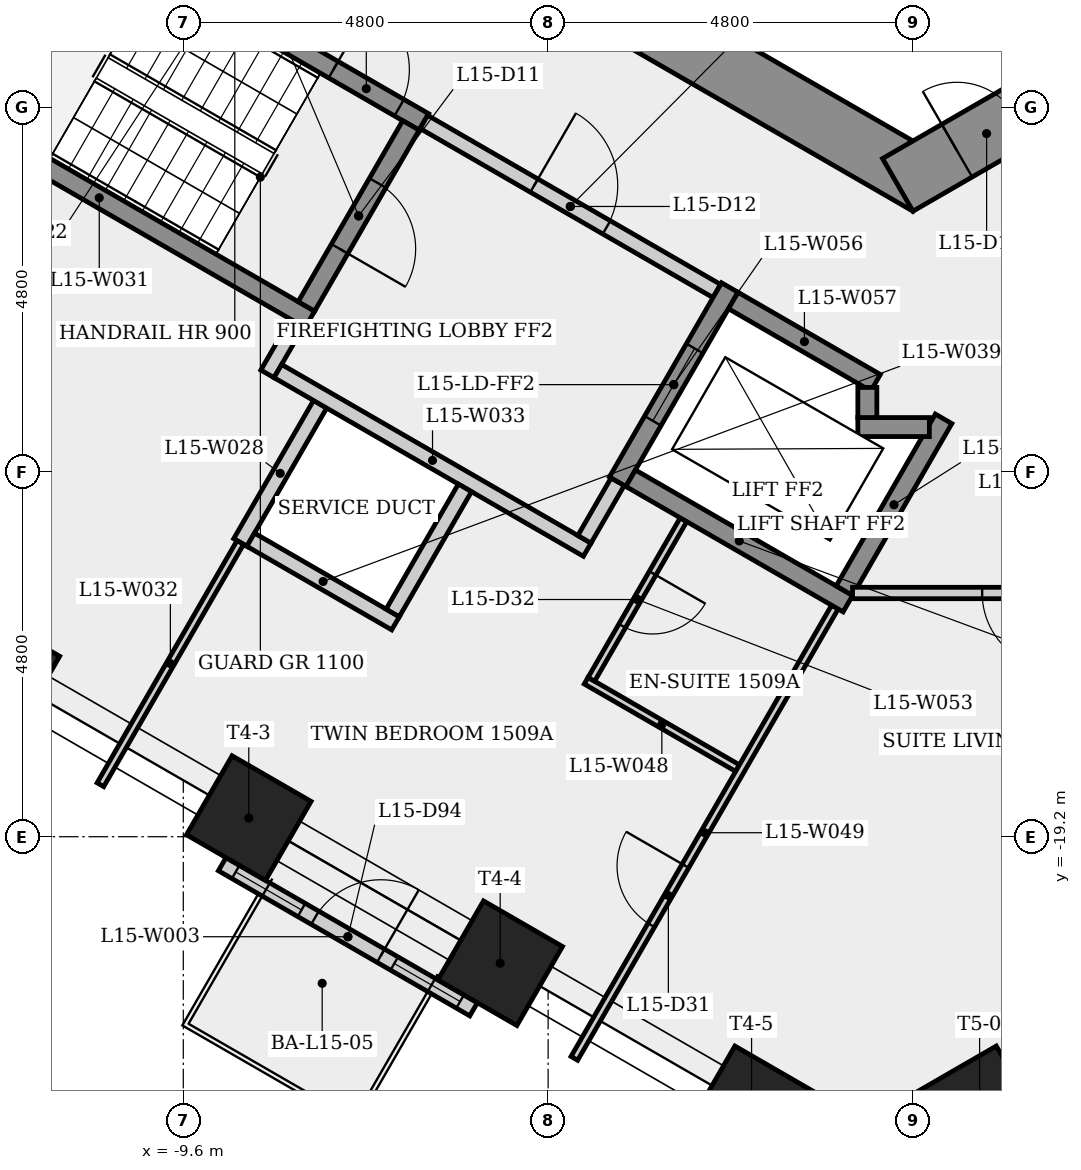
"""IFC4 building model, lengths in metres.
Left out: names, types, materials, properties, quantities, classifications, styles, units other than length and angle.
Written with IfcOpenShell. Run it as: python <this file> out.ifc"""

import sys

from ifc_helpers import new_model, si_unit, direction, frame, frame_2d, origin, origin_2d, place, context, subcontext, project, spatial, rectangle, extrude, element, fill, save


model = new_model("IFC4")
c1 = context("Model", 3, precision=1e-05, world=origin(), true_north=direction((0.0, 1.0)))
c2 = subcontext(c1, "Body", "Model", "MODEL_VIEW")
j1 = project(units=[si_unit("LENGTHUNIT", "METRE"), si_unit("PLANEANGLEUNIT", "RADIAN")], contexts=[c1])
p1 = place(None, origin())
s1 = spatial("IfcSite", under=j1, at=p1, CompositionType="ELEMENT")
p2 = place(p1, origin())
s2 = spatial("IfcBuilding", under=s1, at=p2, CompositionType="ELEMENT")
p3 = place(p2, frame((0.0, 0.0, 59.5)))
s3 = spatial("IfcBuildingStorey", under=s2, at=p3, CompositionType="ELEMENT", Elevation=59.5)
p4 = place(p3, frame((-9.3, -5.138, 0.0), z_axis=(0.0, 0.0, 1.0), x_axis=(0.866023993627, -0.500002442456, 0.0)))
e1 = element("IfcWall", 1, at=p4, inside=s3, PredefinedType="SHEAR", context=c2, shape_type="SweptSolid", body=[
    extrude(rectangle(XDim=10.97, YDim=0.8, at=frame_2d((5.485, 0.0))), origin(), (0.0, 0.0, 1.0), 3.4),
])
p5 = place(p4, frame((0.78, 0.0, 0.0)))
e2 = element("IfcOpeningElement", 2, at=p5, cuts=e1, PredefinedType="OPENING", context=c2, shape_type="SweptSolid", body=[
    extrude(rectangle(XDim=0.9, YDim=2.1, at=frame_2d((0.45, 1.05))), frame((0.0, 0.41, 0.0), z_axis=(0.0, -1.0, 0.0), x_axis=(1.0, 0.0, 0.0)), (0.0, 0.0, 1.0), 0.82),
])
p6 = place(p3, frame((-0.2, -10.623, 0.0), z_axis=(0.0, 0.0, 1.0), x_axis=(0.866023993627, 0.500002442456, 0.0)))
e3 = element("IfcWall", 3, at=p6, inside=s3, PredefinedType="SHEAR", context=c2, shape_type="SweptSolid", body=[
    extrude(rectangle(XDim=10.97, YDim=0.8, at=frame_2d((5.485, 0.0))), origin(), (0.0, 0.0, 1.0), 3.4),
])
p7 = place(p6, frame((0.9, 0.0, 0.0)))
e4 = element("IfcOpeningElement", 4, at=p7, cuts=e3, PredefinedType="OPENING", context=c2, shape_type="SweptSolid", body=[
    extrude(rectangle(XDim=0.9, YDim=2.1, at=frame_2d((0.45, 1.05))), frame((0.0, 0.41, 0.0), z_axis=(0.0, -1.0, 0.0), x_axis=(1.0, 0.0, 0.0)), (0.0, 0.0, 1.0), 0.82),
])
p8 = place(p6, frame((7.455, 0.0, 0.0)))
e5 = element("IfcOpeningElement", 5, at=p8, cuts=e3, PredefinedType="OPENING", context=c2, shape_type="SweptSolid", body=[
    extrude(rectangle(XDim=0.9, YDim=2.1, at=frame_2d((0.45, 1.05))), frame((0.0, 0.41, 0.0), z_axis=(0.0, -1.0, 0.0), x_axis=(1.0, 0.0, 0.0)), (0.0, 0.0, 1.0), 0.82),
])
for number, where, z_axis, x_axis in (
    (6, (-12.046, -17.045, 0.0), (0.0, 0.0, 1.0), (-0.5, -0.866, 0.0)),
    (7, (-8.739, -18.955, 0.0), (0.0, 0.0, 1.0), (-0.5, -0.866, 0.0)),
    (8, (-5.431, -20.865, 0.0), (0.0, 0.0, 1.0), (-0.5, -0.866, 0.0)),
    (9, (-2.123, -22.774, 0.0), (0.0, 0.0, 1.0), (-0.5, -0.866, 0.0)),
    (10, (0.877, -22.774, 0.0), (0.0, 0.0, 1.0), (0.5, -0.866, 0.0)),
):
    element("IfcColumn", number, at=place(p3, frame(where, z_axis=z_axis, x_axis=x_axis)), inside=s3, PredefinedType="COLUMN", context=c2, shape_type="SweptSolid", body=[
        extrude(rectangle(XDim=1.2, YDim=1.2, at=origin_2d()), origin(), (0.0, 0.0, 1.0), 3.4),
    ])
p9 = place(p3, frame((-9.088, -19.561, 0.0), z_axis=(0.0, 0.0, 1.0), x_axis=(0.866035482435, -0.49998254286, 0.0)))
e11 = element("IfcWall", 11, at=p9, inside=s3, PredefinedType="SOLIDWALL", context=c2, shape_type="SweptSolid", body=[
    extrude(rectangle(XDim=3.819, YDim=0.2, at=frame_2d((1.91, 0.0))), origin(), (0.0, 0.0, 1.0), 3.4),
])
p10 = place(p9, frame((1.409, 0.0, 0.0)))
e12 = element("IfcOpeningElement", 12, at=p10, cuts=e11, PredefinedType="OPENING", context=c2, shape_type="SweptSolid", body=[
    extrude(rectangle(XDim=1.0, YDim=2.4, at=frame_2d((0.5, 1.2))), frame((0.0, 0.11, 0.0), z_axis=(0.0, -1.0, 0.0), x_axis=(1.0, 0.0, 0.0)), (0.0, 0.0, 1.0), 0.22),
])
p11 = place(p9, frame((0.205, 0.0, 0.9)))
e13 = element("IfcOpeningElement", 13, at=p11, cuts=e11, PredefinedType="OPENING", context=c2, shape_type="SweptSolid", body=[
    extrude(rectangle(XDim=1.0, YDim=1.5, at=frame_2d((0.5, 0.75))), frame((0.0, 0.11, 0.0), z_axis=(0.0, -1.0, 0.0), x_axis=(1.0, 0.0, 0.0)), (0.0, 0.0, 1.0), 0.22),
])
p12 = place(p9, frame((2.614, 0.0, 0.9)))
e14 = element("IfcOpeningElement", 14, at=p12, cuts=e11, PredefinedType="OPENING", context=c2, shape_type="SweptSolid", body=[
    extrude(rectangle(XDim=1.0, YDim=1.5, at=frame_2d((0.5, 0.75))), frame((0.0, 0.11, 0.0), z_axis=(0.0, -1.0, 0.0), x_axis=(1.0, 0.0, 0.0)), (0.0, 0.0, 1.0), 0.22),
])
p13 = place(p3, frame((-11.977, -6.595, 0.0), z_axis=(0.0, 0.0, 1.0), x_axis=(0.866025499775, -0.499999833739, 0.0)))
e15 = element("IfcWall", 15, at=p13, inside=s3, PredefinedType="SHEAR", context=c2, shape_type="SweptSolid", body=[
    extrude(rectangle(XDim=6.4, YDim=0.25, at=frame_2d((3.2, 0.0))), origin(), (0.0, 0.0, 1.0), 3.05),
])
p14 = place(p13, frame((5.025, 0.0, 0.0)))
e16 = element("IfcOpeningElement", 16, at=p14, cuts=e15, PredefinedType="OPENING", context=c2, shape_type="SweptSolid", body=[
    extrude(rectangle(XDim=1.0, YDim=2.1, at=frame_2d((0.5, 1.05))), frame((0.0, 0.135, 0.0), z_axis=(0.0, -1.0, 0.0), x_axis=(1.0, 0.0, 0.0)), (0.0, 0.0, 1.0), 0.27),
])
p15 = place(p3, frame((-8.85, -15.329, 0.0), z_axis=(0.0, 0.0, 1.0), x_axis=(0.500027713859, 0.866009402589, 0.0)))
e17 = element("IfcWall", 17, at=p15, inside=s3, PredefinedType="PLUMBINGWALL", context=c2, shape_type="SweptSolid", body=[
    extrude(rectangle(XDim=2.1, YDim=0.2, at=frame_2d((1.05, 0.0))), origin(), (0.0, 0.0, 1.0), 3.05),
])
p16 = place(p3, frame((-8.493, -13.11, 0.0), z_axis=(0.0, 0.0, 1.0), x_axis=(0.500067724834, 0.865986299303, 0.0)))
e18 = element("IfcWall", 18, at=p16, inside=s3, PredefinedType="PARTITIONING", context=c2, shape_type="SweptSolid", body=[
    extrude(rectangle(XDim=0.775, YDim=0.2, at=frame_2d((0.388, 0.0))), origin(), (0.0, 0.0, 1.0), 3.05),
])
p17 = place(p3, frame((-7.935, -12.393, 0.0), z_axis=(0.0, 0.0, 1.0), x_axis=(-0.866025499775, 0.499999833739, 0.0)))
e19 = element("IfcWall", 19, at=p17, inside=s3, PredefinedType="SHEAR", context=c2, shape_type="SweptSolid", body=[
    extrude(rectangle(XDim=6.4, YDim=0.25, at=frame_2d((3.2, 0.0))), origin(), (0.0, 0.0, 1.0), 3.05),
])
p18 = place(p3, frame((-10.69, -18.516, 0.0), z_axis=(0.0, 0.0, 1.0), x_axis=(0.499955964762, 0.866050826049, 0.0)))
e20 = element("IfcWall", 20, at=p18, inside=s3, PredefinedType="PARTITIONING", context=c2, shape_type="SweptSolid", body=[
    extrude(rectangle(XDim=3.68, YDim=0.1, at=frame_2d((1.84, 0.0))), origin(), (0.0, 0.0, 1.0), 3.05),
])
p19 = place(p3, frame((-8.356, -13.073, 0.0), z_axis=(0.0, 0.0, 1.0), x_axis=(0.866038532462, -0.499977259774, 0.0)))
e21 = element("IfcWall", 21, at=p19, inside=s3, PredefinedType="PARTITIONING", context=c2, shape_type="SweptSolid", body=[
    extrude(rectangle(XDim=4.7, YDim=0.2, at=frame_2d((2.35, 0.0))), origin(), (0.0, 0.0, 1.0), 3.05),
])
p20 = place(p3, frame((-6.808, -16.392, 0.0), z_axis=(0.0, 0.0, 1.0), x_axis=(-0.866008176907, 0.50002983664, 0.0)))
e22 = element("IfcWall", 22, at=p20, inside=s3, PredefinedType="PLUMBINGWALL", context=c2, shape_type="SweptSolid", body=[
    extrude(rectangle(XDim=2.2, YDim=0.2, at=frame_2d((1.1, 0.0))), origin(), (0.0, 0.0, 1.0), 3.05),
])
p21 = place(p3, frame((-6.605, -9.841, 0.0), z_axis=(0.0, 0.0, 1.0), x_axis=(-0.499996545922, -0.866027397988, 0.0)))
e23 = element("IfcWall", 23, at=p21, inside=s3, PredefinedType="SHEAR", context=c2, shape_type="SweptSolid", body=[
    extrude(rectangle(XDim=2.75, YDim=0.25, at=frame_2d((1.375, 0.0))), origin(), (0.0, 0.0, 1.0), 3.05),
])
p22 = place(p21, frame((0.875, 0.0, 0.0)))
e24 = element("IfcOpeningElement", 24, at=p22, cuts=e23, PredefinedType="OPENING", context=c2, shape_type="SweptSolid", body=[
    extrude(rectangle(XDim=1.0, YDim=2.1, at=frame_2d((0.5, 1.05))), frame((0.0, 0.135, 0.0), z_axis=(0.0, -1.0, 0.0), x_axis=(1.0, 0.0, 0.0)), (0.0, 0.0, 1.0), 0.27),
])
p23 = place(p3, frame((-6.435, -9.795, 0.0), z_axis=(0.0, 0.0, 1.0), x_axis=(0.866012907634, -0.500021643343, 0.0)))
e25 = element("IfcWall", 25, at=p23, inside=s3, PredefinedType="PARTITIONING", context=c2, shape_type="SweptSolid", body=[
    extrude(rectangle(XDim=4.45, YDim=0.2, at=frame_2d((2.225, 0.0))), origin(), (0.0, 0.0, 1.0), 3.05),
])
p24 = place(p23, frame((1.675, 0.0, 0.0)))
e26 = element("IfcOpeningElement", 26, at=p24, cuts=e25, PredefinedType="OPENING", context=c2, shape_type="SweptSolid", body=[
    extrude(rectangle(XDim=1.1, YDim=2.1, at=frame_2d((0.55, 1.05))), frame((0.0, 0.11, 0.0), z_axis=(0.0, -1.0, 0.0), x_axis=(1.0, 0.0, 0.0)), (0.0, 0.0, 1.0), 0.22),
])
p25 = place(p3, frame((-5.895, -14.61, 0.0), z_axis=(0.0, 0.0, 1.0), x_axis=(-0.500022797313, -0.86601224135, 0.0)))
e27 = element("IfcWall", 27, at=p25, inside=s3, PredefinedType="PLUMBINGWALL", context=c2, shape_type="SweptSolid", body=[
    extrude(rectangle(XDim=1.9, YDim=0.2, at=frame_2d((0.95, 0.0))), origin(), (0.0, 0.0, 1.0), 3.05),
])
p26 = place(p3, frame((-4.3, -17.147, 0.0), z_axis=(0.0, 0.0, 1.0), x_axis=(0.866053019151, -0.499952165731, 0.0)))
e28 = element("IfcWall", 28, at=p26, inside=s3, PredefinedType="PARTITIONING", context=c2, shape_type="SweptSolid", body=[
    extrude(rectangle(XDim=2.3, YDim=0.1, at=frame_2d((1.15, 0.0))), origin(), (0.0, 0.0, 1.0), 3.05),
])
p27 = place(p3, frame((-4.455, -22.116, 0.0), z_axis=(0.0, 0.0, 1.0), x_axis=(0.499984476993, 0.866034365811, 0.0)))
e29 = element("IfcWall", 29, at=p27, inside=s3, PredefinedType="PARTITIONING", context=c2, shape_type="SweptSolid", body=[
    extrude(rectangle(XDim=6.856, YDim=0.1, at=frame_2d((3.428, 0.0))), origin(), (0.0, 0.0, 1.0), 3.05),
])
p28 = place(p27, frame((2.023, 0.0, 0.0)))
e30 = element("IfcOpeningElement", 30, at=p28, cuts=e29, PredefinedType="OPENING", context=c2, shape_type="SweptSolid", body=[
    extrude(rectangle(XDim=0.9, YDim=2.1, at=frame_2d((0.45, 1.05))), frame((0.0, 0.06, 0.0), z_axis=(0.0, -1.0, 0.0), x_axis=(1.0, 0.0, 0.0)), (0.0, 0.0, 1.0), 0.12),
])
p29 = place(p3, frame((-3.885, -14.529, 0.0), z_axis=(0.0, 0.0, 1.0), x_axis=(-0.499859285417, -0.866106630146, 0.0)))
e31 = element("IfcWall", 31, at=p29, inside=s3, PredefinedType="PARTITIONING", context=c2, shape_type="SweptSolid", body=[
    extrude(rectangle(XDim=0.875, YDim=0.2, at=frame_2d((0.438, 0.0))), origin(), (0.0, 0.0, 1.0), 3.05),
])
p30 = place(p3, frame((-3.019, -15.029, 0.0), z_axis=(0.0, 0.0, 1.0), x_axis=(-0.499972286653, -0.866041403502, 0.0)))
e32 = element("IfcWall", 32, at=p30, inside=s3, PredefinedType="PARTITIONING", context=c2, shape_type="SweptSolid", body=[
    extrude(rectangle(XDim=2.425, YDim=0.1, at=frame_2d((1.212, 0.0))), origin(), (0.0, 0.0, 1.0), 3.05),
])
p31 = place(p30, frame((0.812, 0.0, 0.0)))
e33 = element("IfcOpeningElement", 33, at=p31, cuts=e32, PredefinedType="OPENING", context=c2, shape_type="SweptSolid", body=[
    extrude(rectangle(XDim=0.8, YDim=2.1, at=frame_2d((0.4, 1.05))), frame((0.0, 0.06, 0.0), z_axis=(0.0, -1.0, 0.0), x_axis=(1.0, 0.0, 0.0)), (0.0, 0.0, 1.0), 0.12),
])
p32 = place(p3, frame((-2.41, -11.974, 0.0), z_axis=(0.0, 0.0, 1.0), x_axis=(-0.500001826776, -0.866024349092, 0.0)))
e34 = element("IfcWall", 34, at=p32, inside=s3, PredefinedType="SHEAR", context=c2, shape_type="SweptSolid", body=[
    extrude(rectangle(XDim=2.95, YDim=0.25, at=frame_2d((1.475, 0.0))), origin(), (0.0, 0.0, 1.0), 3.05),
])
p33 = place(p32, frame((0.925, 0.0, 0.0)))
e35 = element("IfcOpeningElement", 35, at=p33, cuts=e34, PredefinedType="OPENING", context=c2, shape_type="SweptSolid", body=[
    extrude(rectangle(XDim=1.1, YDim=2.1, at=frame_2d((0.55, 1.05))), frame((0.0, 0.135, 0.0), z_axis=(0.0, -1.0, 0.0), x_axis=(1.0, 0.0, 0.0)), (0.0, 0.0, 1.0), 0.27),
])
p34 = place(p3, frame((-2.364, -12.145, 0.0), z_axis=(0.0, 0.0, 1.0), x_axis=(0.86603892542, -0.499976579108, 0.0)))
e36 = element("IfcWall", 36, at=p34, inside=s3, PredefinedType="SHEAR", context=c2, shape_type="SweptSolid", body=[
    extrude(rectangle(XDim=2.162, YDim=0.25, at=frame_2d((1.081, 0.0))), origin(), (0.0, 0.0, 1.0), 3.05),
])
p35 = place(p3, frame((-0.856, -16.133, 0.0), z_axis=(0.0, 0.0, 1.0), x_axis=(-0.866021716278, 0.500006386895, 0.0)))
e37 = element("IfcWall", 37, at=p35, inside=s3, PredefinedType="SHEAR", context=c2, shape_type="SweptSolid", body=[
    extrude(rectangle(XDim=3.3, YDim=0.25, at=frame_2d((1.65, 0.0))), origin(), (0.0, 0.0, 1.0), 3.05),
])
p36 = place(p3, frame((-0.902, -15.962, 0.0), z_axis=(0.0, 0.0, 1.0), x_axis=(0.499981517636, 0.866036074319, 0.0)))
e38 = element("IfcWall", 38, at=p36, inside=s3, PredefinedType="SHEAR", context=c2, shape_type="SweptSolid", body=[
    extrude(rectangle(XDim=2.61, YDim=0.25, at=frame_2d((1.305, 0.0))), origin(), (0.0, 0.0, 1.0), 3.05),
])
p37 = place(p3, frame((-0.725, -13.81, 0.0), z_axis=(0.0, 0.0, 1.0), x_axis=(1.0, 0.0, 0.0)))
e39 = element("IfcWall", 39, at=p37, inside=s3, PredefinedType="SHEAR", context=c2, shape_type="SweptSolid", body=[
    extrude(rectangle(XDim=0.941, YDim=0.25, at=frame_2d((0.47, 0.0))), origin(), (0.0, 0.0, 1.0), 3.4),
])
p38 = place(p3, frame((-0.6, -13.289, 0.0), z_axis=(0.0, 0.0, 1.0), x_axis=(0.0, -1.0, 0.0)))
e40 = element("IfcWall", 40, at=p38, inside=s3, PredefinedType="SHEAR", context=c2, shape_type="SweptSolid", body=[
    extrude(rectangle(XDim=0.396, YDim=0.25, at=frame_2d((0.198, 0.0))), origin(), (0.0, 0.0, 1.0), 3.4),
])
p39 = place(p3, frame((3.616, -15.993, 0.0), z_axis=(0.0, 0.0, 1.0), x_axis=(-1.0, 0.0, 0.0)))
e41 = element("IfcWall", 41, at=p39, inside=s3, PredefinedType="PARTITIONING", context=c2, shape_type="SweptSolid", body=[
    extrude(rectangle(XDim=4.411, YDim=0.15, at=frame_2d((2.206, 0.0))), origin(), (0.0, 0.0, 1.0), 3.05),
])
p40 = place(p39, frame((1.706, 0.0, 0.0)))
e42 = element("IfcOpeningElement", 42, at=p40, cuts=e41, PredefinedType="OPENING", context=c2, shape_type="SweptSolid", body=[
    extrude(rectangle(XDim=1.0, YDim=2.1, at=frame_2d((0.5, 1.05))), frame((0.0, 0.085, 0.0), z_axis=(0.0, -1.0, 0.0), x_axis=(1.0, 0.0, 0.0)), (0.0, 0.0, 1.0), 0.17),
])
p41 = place(p10, origin())
e43 = element("IfcDoor", 43, at=p41, inside=s3, OperationType="SINGLE_SWING_RIGHT", PredefinedType="DOOR", context=c2, shape_type="SweptSolid", body=[
    extrude(rectangle(XDim=1.0, YDim=2.4, at=frame_2d((0.5, 1.2))), frame((0.0, 0.025, 0.0), z_axis=(0.0, -1.0, 0.0), x_axis=(1.0, 0.0, 0.0)), (0.0, 0.0, 1.0), 0.05),
])
fill(e12, e43)
p42 = place(p11, origin())
e44 = element("IfcWindow", 44, at=p42, inside=s3, PartitioningType="SINGLE_PANEL", PredefinedType="WINDOW", context=c2, shape_type="SweptSolid", body=[
    extrude(rectangle(XDim=1.0, YDim=1.5, at=frame_2d((0.5, 0.75))), frame((0.0, 0.03, 0.0), z_axis=(0.0, -1.0, 0.0), x_axis=(1.0, 0.0, 0.0)), (0.0, 0.0, 1.0), 0.06),
])
fill(e13, e44)
p43 = place(p12, origin())
e45 = element("IfcWindow", 45, at=p43, inside=s3, PartitioningType="SINGLE_PANEL", PredefinedType="WINDOW", context=c2, shape_type="SweptSolid", body=[
    extrude(rectangle(XDim=1.0, YDim=1.5, at=frame_2d((0.5, 0.75))), frame((0.0, 0.03, 0.0), z_axis=(0.0, -1.0, 0.0), x_axis=(1.0, 0.0, 0.0)), (0.0, 0.0, 1.0), 0.06),
])
fill(e14, e45)
p44 = place(p14, origin())
e46 = element("IfcDoor", 46, at=p44, inside=s3, OperationType="SINGLE_SWING_LEFT", PredefinedType="DOOR", context=c2, shape_type="SweptSolid", body=[
    extrude(rectangle(XDim=1.0, YDim=2.1, at=frame_2d((0.5, 1.05))), frame((0.0, 0.025, 0.0), z_axis=(0.0, -1.0, 0.0), x_axis=(1.0, 0.0, 0.0)), (0.0, 0.0, 1.0), 0.05),
])
fill(e16, e46)
p45 = place(p22, origin())
e47 = element("IfcDoor", 47, at=p45, inside=s3, OperationType="SINGLE_SWING_RIGHT", PredefinedType="DOOR", context=c2, shape_type="SweptSolid", body=[
    extrude(rectangle(XDim=1.0, YDim=2.1, at=frame_2d((0.5, 1.05))), frame((0.0, 0.025, 0.0), z_axis=(0.0, -1.0, 0.0), x_axis=(1.0, 0.0, 0.0)), (0.0, 0.0, 1.0), 0.05),
])
fill(e24, e47)
p46 = place(p24, origin())
e48 = element("IfcDoor", 48, at=p46, inside=s3, OperationType="SINGLE_SWING_LEFT", PredefinedType="DOOR", context=c2, shape_type="SweptSolid", body=[
    extrude(rectangle(XDim=1.1, YDim=2.1, at=frame_2d((0.55, 1.05))), frame((0.0, 0.025, 0.0), z_axis=(0.0, -1.0, 0.0), x_axis=(1.0, 0.0, 0.0)), (0.0, 0.0, 1.0), 0.05),
])
fill(e26, e48)
p47 = place(p33, origin())
e49 = element("IfcDoor", 49, at=p47, inside=s3, OperationType="SLIDING_TO_LEFT", PredefinedType="DOOR", context=c2, shape_type="SweptSolid", body=[
    extrude(rectangle(XDim=1.1, YDim=2.1, at=frame_2d((0.55, 1.05))), frame((0.0, 0.025, 0.0), z_axis=(0.0, -1.0, 0.0), x_axis=(1.0, 0.0, 0.0)), (0.0, 0.0, 1.0), 0.05),
])
fill(e35, e49)
p48 = place(p40, origin())
e50 = element("IfcDoor", 50, at=p48, inside=s3, OperationType="SINGLE_SWING_LEFT", PredefinedType="DOOR", context=c2, shape_type="SweptSolid", body=[
    extrude(rectangle(XDim=1.0, YDim=2.1, at=frame_2d((0.5, 1.05))), frame((0.0, 0.025, 0.0), z_axis=(0.0, -1.0, 0.0), x_axis=(1.0, 0.0, 0.0)), (0.0, 0.0, 1.0), 0.05),
])
fill(e42, e50)
p49 = place(p28, origin())
e51 = element("IfcDoor", 51, at=p49, inside=s3, OperationType="SINGLE_SWING_RIGHT", PredefinedType="DOOR", context=c2, shape_type="SweptSolid", body=[
    extrude(rectangle(XDim=0.9, YDim=2.1, at=frame_2d((0.45, 1.05))), frame((0.0, 0.025, 0.0), z_axis=(0.0, -1.0, 0.0), x_axis=(1.0, 0.0, 0.0)), (0.0, 0.0, 1.0), 0.05),
])
fill(e30, e51)
p50 = place(p31, origin())
e52 = element("IfcDoor", 52, at=p50, inside=s3, OperationType="SINGLE_SWING_LEFT", PredefinedType="DOOR", context=c2, shape_type="SweptSolid", body=[
    extrude(rectangle(XDim=0.8, YDim=2.1, at=frame_2d((0.4, 1.05))), frame((0.0, 0.025, 0.0), z_axis=(0.0, -1.0, 0.0), x_axis=(1.0, 0.0, 0.0)), (0.0, 0.0, 1.0), 0.05),
])
fill(e33, e52)
p51 = place(p7, origin())
e53 = element("IfcDoor", 53, at=p51, inside=s3, OperationType="SINGLE_SWING_LEFT", PredefinedType="DOOR", context=c2, shape_type="SweptSolid", body=[
    extrude(rectangle(XDim=0.9, YDim=2.1, at=frame_2d((0.45, 1.05))), frame((0.0, 0.025, 0.0), z_axis=(0.0, -1.0, 0.0), x_axis=(1.0, 0.0, 0.0)), (0.0, 0.0, 1.0), 0.05),
])
fill(e4, e53)
save(model, sys.argv[1])
